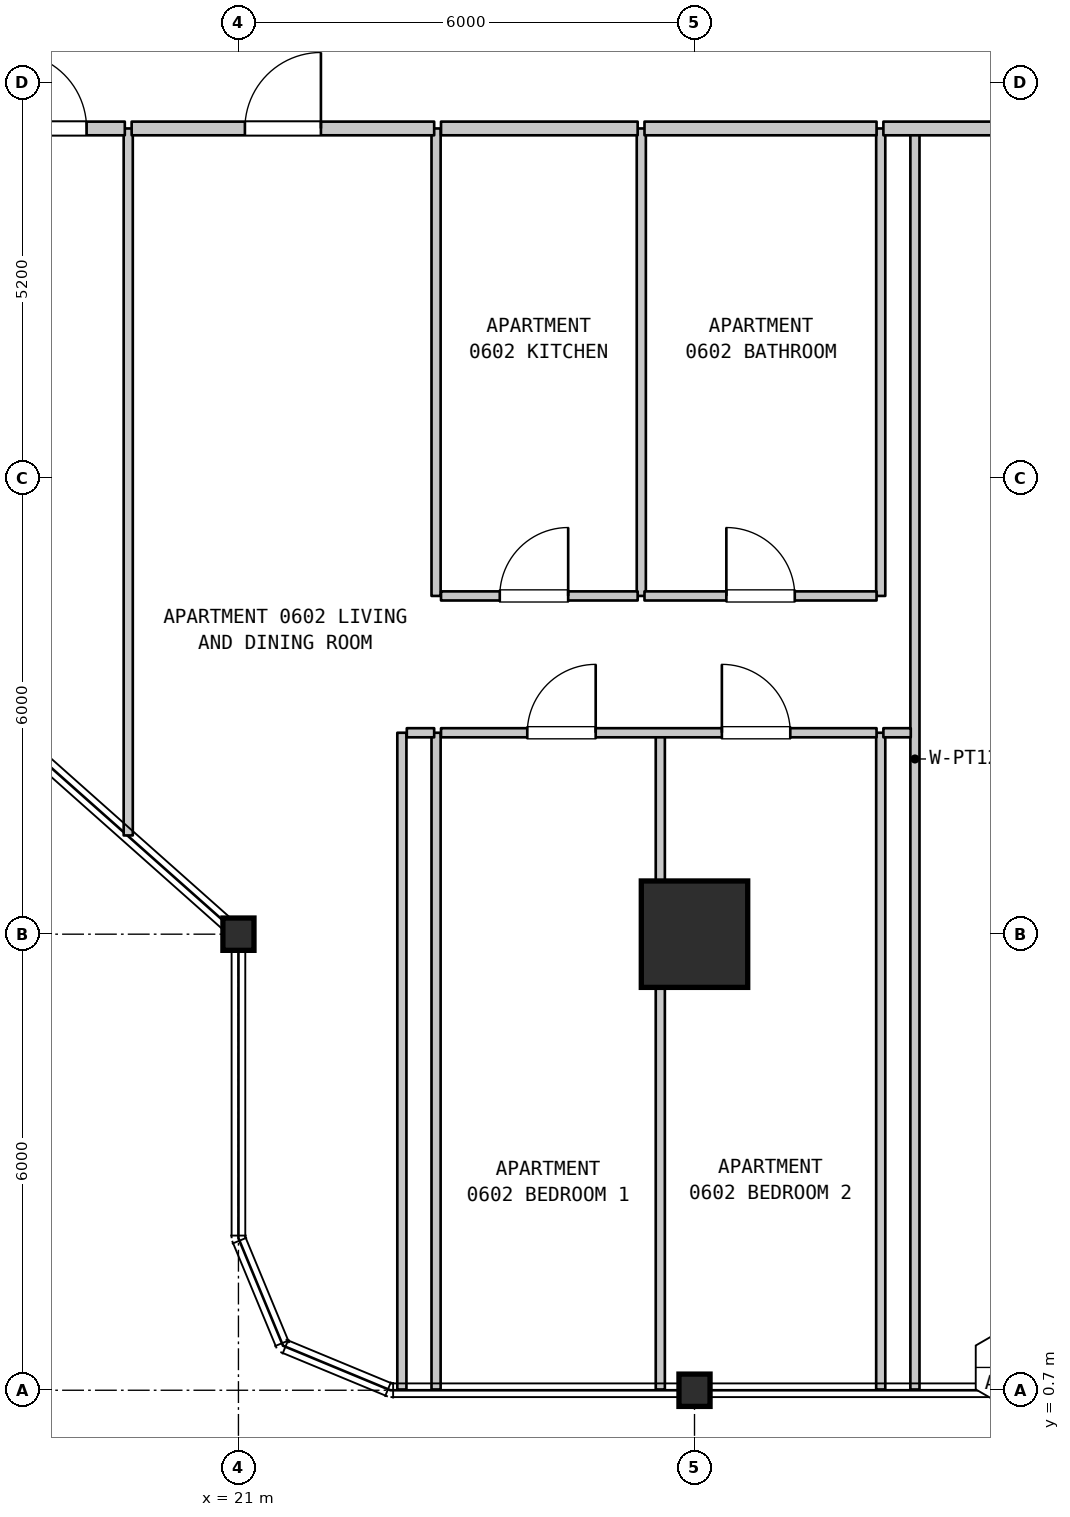
"""IFC4 building model, lengths in metres.
Left out: names, types, materials, properties, quantities, classifications, styles, units other than length and angle.
Written with IfcOpenShell. Run it as: python <this file> out.ifc"""

import sys

from ifc_helpers import new_model, si_unit, direction, frame, frame_2d, origin, origin_2d, place, context, subcontext, project, spatial, rectangle, i_section, extrude, element, fill, save


model = new_model("IFC4")
c1 = context("Model", 3, precision=1e-05, world=origin(), true_north=direction((0.0, 1.0)))
c2 = subcontext(c1, "Body", "Model", "MODEL_VIEW")
j1 = project(units=[si_unit("LENGTHUNIT", "METRE"), si_unit("PLANEANGLEUNIT", "RADIAN")], contexts=[c1])
p1 = place(None, origin())
s1 = spatial("IfcSite", under=j1, at=p1, CompositionType="ELEMENT")
p2 = place(p1, origin())
s2 = spatial("IfcBuilding", under=s1, at=p2, CompositionType="ELEMENT")
p3 = place(p2, frame((0.0, 0.0, 31.4)))
s3 = spatial("IfcBuildingStorey", under=s2, at=p3, CompositionType="ELEMENT", Elevation=31.4)
for number, where, z_axis, x_axis in (
    (1, (21.0, 6.7, 0.0), (0.0, 0.0, 1.0), (1.0, 0.0, 0.0)),
    (2, (27.0, 0.7, 0.0), (0.0, 0.0, 1.0), (1.0, 0.0, 0.0)),
):
    element("IfcColumn", number, at=place(p3, frame(where, z_axis=z_axis, x_axis=x_axis)), inside=s3, PredefinedType="COLUMN", context=c2, shape_type="SweptSolid", body=[
        extrude(i_section(OverallWidth=0.409, OverallDepth=0.425, WebThickness=0.032, FlangeThickness=0.052, FilletRadius=0.015, at=origin_2d()), origin(), (0.0, 0.0, 1.0), 3.7),
    ])
p4 = place(p3, frame((27.0, 6.7, 0.0), z_axis=(0.0, 0.0, 1.0), x_axis=(1.0, 0.0, 0.0)))
e3 = element("IfcColumn", 3, at=p4, inside=s3, PredefinedType="COLUMN", context=c2, shape_type="SweptSolid", body=[
    extrude(rectangle(XDim=1.4, YDim=1.4, at=origin_2d()), origin(), (0.0, 0.0, 1.0), 3.7),
])
p5 = place(p3, frame((19.55, 7.999, 0.0), z_axis=(0.0, 0.0, 1.0), x_axis=(0.0, 1.0, 0.0)))
e4 = element("IfcWall", 4, at=p5, inside=s3, PredefinedType="PARTITIONING", context=c2, shape_type="SweptSolid", body=[
    extrude(rectangle(XDim=9.301, YDim=0.12, at=frame_2d((4.65, 0.0))), origin(), (0.0, 0.0, 1.0), 3.385),
])
for number, where, z_axis, x_axis in (
    (5, (23.15, 0.71, 0.0), (0.0, 0.0, 1.0), (0.0, 1.0, 0.0)),
    (6, (23.6, 0.71, 0.0), (0.0, 0.0, 1.0), (0.0, 1.0, 0.0)),
):
    element("IfcWall", number, at=place(p3, frame(where, z_axis=z_axis, x_axis=x_axis)), inside=s3, PredefinedType="PARTITIONING", context=c2, shape_type="SweptSolid", body=[
        extrude(rectangle(XDim=8.64, YDim=0.12, at=frame_2d((4.32, 0.0))), origin(), (0.0, 0.0, 1.0), 3.385),
    ])
for number, where, z_axis, x_axis in (
    (7, (23.6, 11.15, 0.0), (0.0, 0.0, 1.0), (0.0, 1.0, 0.0)),
    (8, (26.3, 11.15, 0.0), (0.0, 0.0, 1.0), (0.0, 1.0, 0.0)),
):
    element("IfcWall", number, at=place(p3, frame(where, z_axis=z_axis, x_axis=x_axis)), inside=s3, PredefinedType="PARTITIONING", context=c2, shape_type="SweptSolid", body=[
        extrude(rectangle(XDim=6.15, YDim=0.12, at=frame_2d((3.075, 0.0))), origin(), (0.0, 0.0, 1.0), 3.385),
    ])
for number, where, z_axis, x_axis in (
    (9, (26.55, 0.71, 0.0), (0.0, 0.0, 1.0), (0.0, 1.0, 0.0)),
    (10, (29.45, 0.71, 0.0), (0.0, 0.0, 1.0), (0.0, 1.0, 0.0)),
):
    element("IfcWall", number, at=place(p3, frame(where, z_axis=z_axis, x_axis=x_axis)), inside=s3, PredefinedType="PARTITIONING", context=c2, shape_type="SweptSolid", body=[
        extrude(rectangle(XDim=8.64, YDim=0.12, at=frame_2d((4.32, 0.0))), origin(), (0.0, 0.0, 1.0), 3.385),
    ])
p6 = place(p3, frame((29.45, 11.15, 0.0), z_axis=(0.0, 0.0, 1.0), x_axis=(0.0, 1.0, 0.0)))
e11 = element("IfcWall", 11, at=p6, inside=s3, PredefinedType="PARTITIONING", context=c2, shape_type="SweptSolid", body=[
    extrude(rectangle(XDim=6.15, YDim=0.12, at=frame_2d((3.075, 0.0))), origin(), (0.0, 0.0, 1.0), 3.385),
])
p7 = place(p3, frame((29.9, 0.71, 0.0), z_axis=(0.0, 0.0, 1.0), x_axis=(0.0, 1.0, 0.0)))
e12 = element("IfcWall", 12, at=p7, inside=s3, PredefinedType="PARTITIONING", context=c2, shape_type="SweptSolid", body=[
    extrude(rectangle(XDim=16.59, YDim=0.12, at=frame_2d((8.295, 0.0))), origin(), (0.0, 0.0, 1.0), 3.385),
])
p8 = place(p3, frame((23.215, 9.35, 0.0), z_axis=(0.0, 0.0, 1.0), x_axis=(1.0, 0.0, 0.0)))
e13 = element("IfcWall", 13, at=p8, inside=s3, PredefinedType="PARTITIONING", context=c2, shape_type="SweptSolid", body=[
    extrude(rectangle(XDim=0.36, YDim=0.12, at=frame_2d((0.18, 0.0))), origin(), (0.0, 0.0, 1.0), 3.385),
])
p9 = place(p3, frame((23.665, 9.35, 0.0), z_axis=(0.0, 0.0, 1.0), x_axis=(1.0, 0.0, 0.0)))
e14 = element("IfcWall", 14, at=p9, inside=s3, PredefinedType="PARTITIONING", context=c2, shape_type="SweptSolid", body=[
    extrude(rectangle(XDim=5.73, YDim=0.12, at=frame_2d((2.865, 0.0))), origin(), (0.0, 0.0, 1.0), 3.385),
])
p10 = place(p9, frame((1.135, 0.0, 0.0)))
e15 = element("IfcOpeningElement", 15, at=p10, cuts=e14, PredefinedType="OPENING", context=c2, shape_type="SweptSolid", body=[
    extrude(rectangle(XDim=0.9, YDim=2.15, at=frame_2d((0.45, 1.075))), frame((0.0, 0.07, 0.0), z_axis=(0.0, -1.0, 0.0), x_axis=(1.0, 0.0, 0.0)), (0.0, 0.0, 1.0), 0.14),
])
p11 = place(p9, frame((3.695, 0.0, 0.0)))
e16 = element("IfcOpeningElement", 16, at=p11, cuts=e14, PredefinedType="OPENING", context=c2, shape_type="SweptSolid", body=[
    extrude(rectangle(XDim=0.9, YDim=2.15, at=frame_2d((0.45, 1.075))), frame((0.0, 0.07, 0.0), z_axis=(0.0, -1.0, 0.0), x_axis=(1.0, 0.0, 0.0)), (0.0, 0.0, 1.0), 0.14),
])
p12 = place(p3, frame((29.485, 9.35, 0.0), z_axis=(0.0, 0.0, 1.0), x_axis=(1.0, 0.0, 0.0)))
e17 = element("IfcWall", 17, at=p12, inside=s3, PredefinedType="PARTITIONING", context=c2, shape_type="SweptSolid", body=[
    extrude(rectangle(XDim=0.36, YDim=0.12, at=frame_2d((0.18, 0.0))), origin(), (0.0, 0.0, 1.0), 3.385),
])
p13 = place(p3, frame((23.665, 11.15, 0.0), z_axis=(0.0, 0.0, 1.0), x_axis=(1.0, 0.0, 0.0)))
e18 = element("IfcWall", 18, at=p13, inside=s3, PredefinedType="PARTITIONING", context=c2, shape_type="SweptSolid", body=[
    extrude(rectangle(XDim=2.587, YDim=0.12, at=frame_2d((1.293, 0.0))), origin(), (0.0, 0.0, 1.0), 3.385),
])
p14 = place(p13, frame((0.773, 0.0, 0.0)))
e19 = element("IfcOpeningElement", 19, at=p14, cuts=e18, PredefinedType="OPENING", context=c2, shape_type="SweptSolid", body=[
    extrude(rectangle(XDim=0.9, YDim=2.15, at=frame_2d((0.45, 1.075))), frame((0.0, 0.07, 0.0), z_axis=(0.0, -1.0, 0.0), x_axis=(1.0, 0.0, 0.0)), (0.0, 0.0, 1.0), 0.14),
])
p15 = place(p3, frame((26.342, 11.15, 0.0), z_axis=(0.0, 0.0, 1.0), x_axis=(1.0, 0.0, 0.0)))
e20 = element("IfcWall", 20, at=p15, inside=s3, PredefinedType="PARTITIONING", context=c2, shape_type="SweptSolid", body=[
    extrude(rectangle(XDim=3.053, YDim=0.12, at=frame_2d((1.526, 0.0))), origin(), (0.0, 0.0, 1.0), 3.385),
])
p16 = place(p15, frame((1.077, 0.0, 0.0)))
e21 = element("IfcOpeningElement", 21, at=p16, cuts=e20, PredefinedType="OPENING", context=c2, shape_type="SweptSolid", body=[
    extrude(rectangle(XDim=0.9, YDim=2.1, at=frame_2d((0.45, 1.05))), frame((0.0, 0.07, 0.0), z_axis=(0.0, -1.0, 0.0), x_axis=(1.0, 0.0, 0.0)), (0.0, 0.0, 1.0), 0.14),
])
p17 = place(p3, frame((17.645, 17.3, 0.0), z_axis=(0.0, 0.0, 1.0), x_axis=(1.0, 0.0, 0.0)))
e22 = element("IfcWall", 22, at=p17, inside=s3, PredefinedType="STANDARD", context=c2, shape_type="SweptSolid", body=[
    extrude(rectangle(XDim=1.86, YDim=0.18, at=frame_2d((0.93, 0.0))), origin(), (0.0, 0.0, 1.0), 3.385),
])
p18 = place(p17, frame((0.357, 0.0, 0.0)))
e23 = element("IfcOpeningElement", 23, at=p18, cuts=e22, PredefinedType="OPENING", context=c2, shape_type="SweptSolid", body=[
    extrude(rectangle(XDim=1.0, YDim=2.15, at=frame_2d((0.5, 1.075))), frame((0.0, 0.1, 0.0), z_axis=(0.0, -1.0, 0.0), x_axis=(1.0, 0.0, 0.0)), (0.0, 0.0, 1.0), 0.2),
])
p19 = place(p3, frame((19.595, 17.3, 0.0), z_axis=(0.0, 0.0, 1.0), x_axis=(1.0, 0.0, 0.0)))
e24 = element("IfcWall", 24, at=p19, inside=s3, PredefinedType="STANDARD", context=c2, shape_type="SweptSolid", body=[
    extrude(rectangle(XDim=3.98, YDim=0.18, at=frame_2d((1.99, 0.0))), origin(), (0.0, 0.0, 1.0), 3.385),
])
p20 = place(p19, frame((1.49, 0.0, 0.0)))
e25 = element("IfcOpeningElement", 25, at=p20, cuts=e24, PredefinedType="OPENING", context=c2, shape_type="SweptSolid", body=[
    extrude(rectangle(XDim=1.0, YDim=2.15, at=frame_2d((0.5, 1.075))), frame((0.0, 0.1, 0.0), z_axis=(0.0, -1.0, 0.0), x_axis=(1.0, 0.0, 0.0)), (0.0, 0.0, 1.0), 0.2),
])
p21 = place(p3, frame((23.665, 17.3, 0.0), z_axis=(0.0, 0.0, 1.0), x_axis=(1.0, 0.0, 0.0)))
e26 = element("IfcWall", 26, at=p21, inside=s3, PredefinedType="STANDARD", context=c2, shape_type="SweptSolid", body=[
    extrude(rectangle(XDim=2.587, YDim=0.18, at=frame_2d((1.293, 0.0))), origin(), (0.0, 0.0, 1.0), 3.385),
])
p22 = place(p3, frame((26.342, 17.3, 0.0), z_axis=(0.0, 0.0, 1.0), x_axis=(1.0, 0.0, 0.0)))
e27 = element("IfcWall", 27, at=p22, inside=s3, PredefinedType="STANDARD", context=c2, shape_type="SweptSolid", body=[
    extrude(rectangle(XDim=3.053, YDim=0.18, at=frame_2d((1.526, 0.0))), origin(), (0.0, 0.0, 1.0), 3.385),
])
p23 = place(p3, frame((29.485, 17.3, 0.0), z_axis=(0.0, 0.0, 1.0), x_axis=(1.0, 0.0, 0.0)))
e28 = element("IfcWall", 28, at=p23, inside=s3, PredefinedType="STANDARD", context=c2, shape_type="SweptSolid", body=[
    extrude(rectangle(XDim=4.41, YDim=0.18, at=frame_2d((2.205, 0.0))), origin(), (0.0, 0.0, 1.0), 3.385),
])
p24 = place(p23, frame((1.617, 0.0, 0.0)))
e29 = element("IfcOpeningElement", 29, at=p24, cuts=e28, PredefinedType="OPENING", context=c2, shape_type="SweptSolid", body=[
    extrude(rectangle(XDim=1.0, YDim=2.15, at=frame_2d((0.5, 1.075))), frame((0.0, 0.1, 0.0), z_axis=(0.0, -1.0, 0.0), x_axis=(1.0, 0.0, 0.0)), (0.0, 0.0, 1.0), 0.2),
])
p25 = place(p10, origin())
e30 = element("IfcDoor", 30, at=p25, inside=s3, OperationType="SINGLE_SWING_RIGHT", PredefinedType="DOOR", context=c2, shape_type="SweptSolid", body=[
    extrude(rectangle(XDim=0.9, YDim=2.15, at=frame_2d((0.45, 1.075))), frame((0.0, 0.025, 0.0), z_axis=(0.0, -1.0, 0.0), x_axis=(1.0, 0.0, 0.0)), (0.0, 0.0, 1.0), 0.05),
])
fill(e15, e30)
p26 = place(p11, origin())
e31 = element("IfcDoor", 31, at=p26, inside=s3, OperationType="SINGLE_SWING_LEFT", PredefinedType="DOOR", context=c2, shape_type="SweptSolid", body=[
    extrude(rectangle(XDim=0.9, YDim=2.15, at=frame_2d((0.45, 1.075))), frame((0.0, 0.025, 0.0), z_axis=(0.0, -1.0, 0.0), x_axis=(1.0, 0.0, 0.0)), (0.0, 0.0, 1.0), 0.05),
])
fill(e16, e31)
p27 = place(p14, origin())
e32 = element("IfcDoor", 32, at=p27, inside=s3, OperationType="SINGLE_SWING_RIGHT", PredefinedType="DOOR", context=c2, shape_type="SweptSolid", body=[
    extrude(rectangle(XDim=0.9, YDim=2.15, at=frame_2d((0.45, 1.075))), frame((0.0, 0.025, 0.0), z_axis=(0.0, -1.0, 0.0), x_axis=(1.0, 0.0, 0.0)), (0.0, 0.0, 1.0), 0.05),
])
fill(e19, e32)
p28 = place(p16, origin())
e33 = element("IfcDoor", 33, at=p28, inside=s3, OperationType="SINGLE_SWING_LEFT", PredefinedType="DOOR", context=c2, shape_type="SweptSolid", body=[
    extrude(rectangle(XDim=0.9, YDim=2.1, at=frame_2d((0.45, 1.05))), frame((0.0, 0.025, 0.0), z_axis=(0.0, -1.0, 0.0), x_axis=(1.0, 0.0, 0.0)), (0.0, 0.0, 1.0), 0.05),
])
fill(e21, e33)
p29 = place(p18, origin())
e34 = element("IfcDoor", 34, at=p29, inside=s3, OperationType="SINGLE_SWING_LEFT", PredefinedType="DOOR", context=c2, shape_type="SweptSolid", body=[
    extrude(rectangle(XDim=1.0, YDim=2.15, at=frame_2d((0.5, 1.075))), frame((0.0, 0.025, 0.0), z_axis=(0.0, -1.0, 0.0), x_axis=(1.0, 0.0, 0.0)), (0.0, 0.0, 1.0), 0.05),
])
fill(e23, e34)
p30 = place(p20, origin())
e35 = element("IfcDoor", 35, at=p30, inside=s3, OperationType="SINGLE_SWING_RIGHT", PredefinedType="DOOR", context=c2, shape_type="SweptSolid", body=[
    extrude(rectangle(XDim=1.0, YDim=2.15, at=frame_2d((0.5, 1.075))), frame((0.0, 0.025, 0.0), z_axis=(0.0, -1.0, 0.0), x_axis=(1.0, 0.0, 0.0)), (0.0, 0.0, 1.0), 0.05),
])
fill(e25, e35)
save(model, sys.argv[1])
